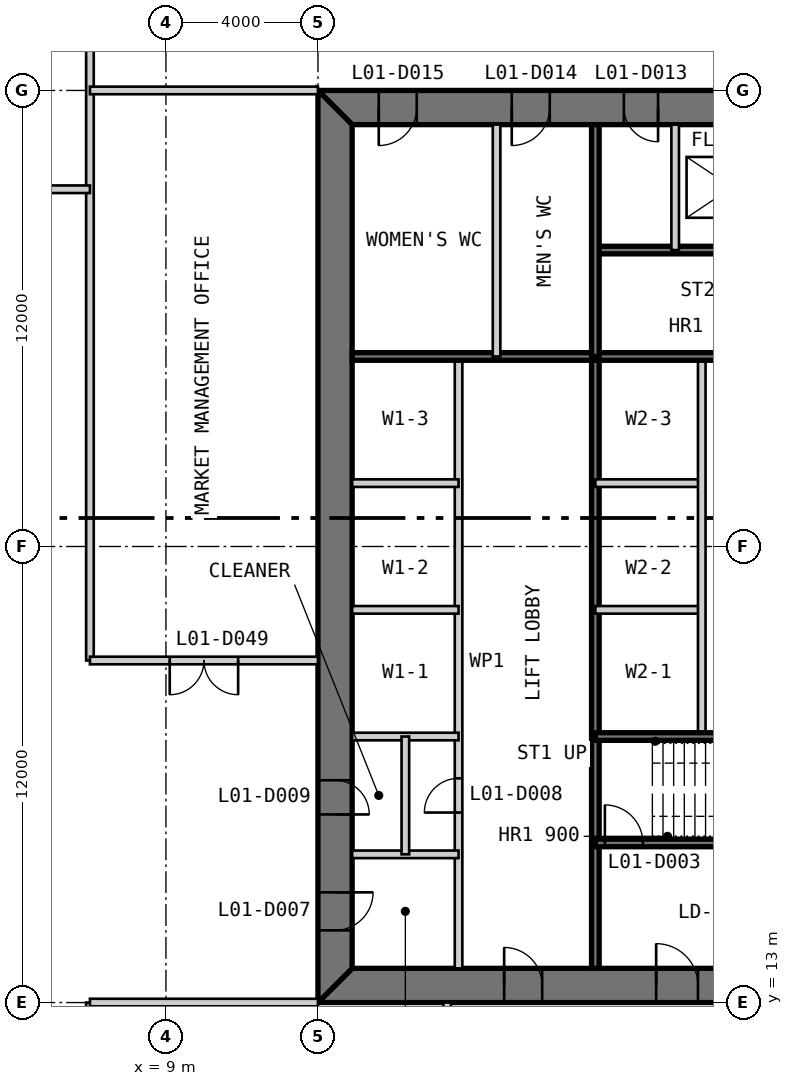
"""IFC4 building model, lengths in metres.
Left out: names, types, materials, properties, quantities, classifications, styles, units other than length and angle.
Written with IfcOpenShell. Run it as: python <this file> out.ifc"""

import sys

from ifc_helpers import new_model, si_unit, direction, frame, frame_2d, origin, place, context, subcontext, project, spatial, polyline, rectangle, outline, extrude, element, fill, save


model = new_model("IFC4")
c1 = context("Model", 3, precision=1e-05, world=origin(), true_north=direction((0.0, 1.0)))
c2 = subcontext(c1, "Body", "Model", "MODEL_VIEW")
j1 = project(units=[si_unit("LENGTHUNIT", "METRE"), si_unit("PLANEANGLEUNIT", "RADIAN")], contexts=[c1])
p1 = place(None, origin())
s1 = spatial("IfcSite", under=j1, at=p1, CompositionType="ELEMENT")
p2 = place(p1, origin())
s2 = spatial("IfcBuilding", under=s1, at=p2, CompositionType="ELEMENT")
p3 = place(p2, frame((0.0, 0.0, 7.0)))
s3 = spatial("IfcBuildingStorey", under=s2, at=p3, CompositionType="ELEMENT", Elevation=7.0)
p4 = place(p3, frame((13.0, 13.45, 0.0), z_axis=(0.0, 0.0, 1.0), x_axis=(1.0, 0.0, 0.0)))
e1 = element("IfcWall", 1, at=p4, inside=s3, PredefinedType="SHEAR", context=c2, shape_type="SweptSolid", body=[
    extrude(outline(polyline([(0.0, -0.45), (24.0, -0.45), (23.1, 0.45), (0.9, 0.45), (0.0, -0.45)])), origin(), (0.0, 0.0, 1.0), 4.8),
])
p5 = place(p4, frame((4.9, 0.0, 0.0)))
e2 = element("IfcOpeningElement", 2, at=p5, cuts=e1, PredefinedType="OPENING", context=c2, shape_type="SweptSolid", body=[
    extrude(rectangle(XDim=1.0, YDim=2.2, at=frame_2d((0.5, 1.1))), frame((0.0, 0.46, 0.0), z_axis=(0.0, -1.0, 0.0), x_axis=(1.0, 0.0, 0.0)), (0.0, 0.0, 1.0), 0.92),
])
p6 = place(p4, frame((8.9, 0.0, 0.0)))
e3 = element("IfcOpeningElement", 3, at=p6, cuts=e1, PredefinedType="OPENING", context=c2, shape_type="SweptSolid", body=[
    extrude(rectangle(XDim=1.1, YDim=2.2, at=frame_2d((0.55, 1.1))), frame((0.0, 0.46, 0.0), z_axis=(0.0, -1.0, 0.0), x_axis=(1.0, 0.0, 0.0)), (0.0, 0.0, 1.0), 0.92),
])
p7 = place(p4, frame((15.05, 0.0, 0.0)))
e4 = element("IfcOpeningElement", 4, at=p7, cuts=e1, PredefinedType="OPENING", context=c2, shape_type="SweptSolid", body=[
    extrude(rectangle(XDim=0.9, YDim=2.2, at=frame_2d((0.45, 1.1))), frame((0.0, 0.46, 0.0), z_axis=(0.0, -1.0, 0.0), x_axis=(1.0, 0.0, 0.0)), (0.0, 0.0, 1.0), 0.92),
])
p8 = place(p4, frame((17.9, 0.0, 0.0)))
e5 = element("IfcOpeningElement", 5, at=p8, cuts=e1, PredefinedType="OPENING", context=c2, shape_type="SweptSolid", body=[
    extrude(rectangle(XDim=1.0, YDim=2.2, at=frame_2d((0.5, 1.1))), frame((0.0, 0.46, 0.0), z_axis=(0.0, -1.0, 0.0), x_axis=(1.0, 0.0, 0.0)), (0.0, 0.0, 1.0), 0.92),
])
p9 = place(p4, frame((21.4, 0.0, 0.0)))
e6 = element("IfcOpeningElement", 6, at=p9, cuts=e1, PredefinedType="OPENING", context=c2, shape_type="SweptSolid", body=[
    extrude(rectangle(XDim=1.0, YDim=2.2, at=frame_2d((0.5, 1.1))), frame((0.0, 0.46, 0.0), z_axis=(0.0, -1.0, 0.0), x_axis=(1.0, 0.0, 0.0)), (0.0, 0.0, 1.0), 0.92),
])
p10 = place(p3, frame((37.0, 36.55, 0.0), z_axis=(0.0, 0.0, 1.0), x_axis=(-1.0, 0.0, 0.0)))
e7 = element("IfcWall", 7, at=p10, inside=s3, PredefinedType="SHEAR", context=c2, shape_type="SweptSolid", body=[
    extrude(outline(polyline([(0.0, -0.45), (24.0, -0.45), (23.1, 0.45), (0.9, 0.45), (0.0, -0.45)])), origin(), (0.0, 0.0, 1.0), 4.8),
])
p11 = place(p10, frame((4.9, 0.0, 0.0)))
e8 = element("IfcOpeningElement", 8, at=p11, cuts=e7, PredefinedType="OPENING", context=c2, shape_type="SweptSolid", body=[
    extrude(rectangle(XDim=1.0, YDim=2.2, at=frame_2d((0.5, 1.1))), frame((0.0, 0.46, 0.0), z_axis=(0.0, -1.0, 0.0), x_axis=(1.0, 0.0, 0.0)), (0.0, 0.0, 1.0), 0.92),
])
p12 = place(p10, frame((8.9, 0.0, 0.0)))
e9 = element("IfcOpeningElement", 9, at=p12, cuts=e7, PredefinedType="OPENING", context=c2, shape_type="SweptSolid", body=[
    extrude(rectangle(XDim=1.1, YDim=2.2, at=frame_2d((0.55, 1.1))), frame((0.0, 0.46, 0.0), z_axis=(0.0, -1.0, 0.0), x_axis=(1.0, 0.0, 0.0)), (0.0, 0.0, 1.0), 0.92),
])
p13 = place(p10, frame((15.05, 0.0, 0.0)))
e10 = element("IfcOpeningElement", 10, at=p13, cuts=e7, PredefinedType="OPENING", context=c2, shape_type="SweptSolid", body=[
    extrude(rectangle(XDim=0.9, YDim=2.2, at=frame_2d((0.45, 1.1))), frame((0.0, 0.46, 0.0), z_axis=(0.0, -1.0, 0.0), x_axis=(1.0, 0.0, 0.0)), (0.0, 0.0, 1.0), 0.92),
])
p14 = place(p10, frame((17.9, 0.0, 0.0)))
e11 = element("IfcOpeningElement", 11, at=p14, cuts=e7, PredefinedType="OPENING", context=c2, shape_type="SweptSolid", body=[
    extrude(rectangle(XDim=1.0, YDim=2.2, at=frame_2d((0.5, 1.1))), frame((0.0, 0.46, 0.0), z_axis=(0.0, -1.0, 0.0), x_axis=(1.0, 0.0, 0.0)), (0.0, 0.0, 1.0), 0.92),
])
p15 = place(p10, frame((21.4, 0.0, 0.0)))
e12 = element("IfcOpeningElement", 12, at=p15, cuts=e7, PredefinedType="OPENING", context=c2, shape_type="SweptSolid", body=[
    extrude(rectangle(XDim=1.0, YDim=2.2, at=frame_2d((0.5, 1.1))), frame((0.0, 0.46, 0.0), z_axis=(0.0, -1.0, 0.0), x_axis=(1.0, 0.0, 0.0)), (0.0, 0.0, 1.0), 0.92),
])
p16 = place(p3, frame((13.45, 36.1, 0.0), z_axis=(0.0, 0.0, 1.0), x_axis=(0.0, -1.0, 0.0)))
e13 = element("IfcWall", 13, at=p16, inside=s3, PredefinedType="SHEAR", context=c2, shape_type="SweptSolid", body=[
    extrude(outline(polyline([(-0.9, -0.45), (23.1, -0.45), (22.2, 0.45), (0.0, 0.45), (-0.9, -0.45)])), origin(), (0.0, 0.0, 1.0), 4.8),
])
p17 = place(p16, frame((20.2, 0.0, 0.0)))
e14 = element("IfcOpeningElement", 14, at=p17, cuts=e13, PredefinedType="OPENING", context=c2, shape_type="SweptSolid", body=[
    extrude(rectangle(XDim=1.0, YDim=2.2, at=frame_2d((0.5, 1.1))), frame((0.0, 0.46, 0.0), z_axis=(0.0, -1.0, 0.0), x_axis=(1.0, 0.0, 0.0)), (0.0, 0.0, 1.0), 0.92),
])
p18 = place(p16, frame((17.25, 0.0, 0.0)))
e15 = element("IfcOpeningElement", 15, at=p18, cuts=e13, PredefinedType="OPENING", context=c2, shape_type="SweptSolid", body=[
    extrude(rectangle(XDim=0.9, YDim=2.2, at=frame_2d((0.45, 1.1))), frame((0.0, 0.46, 0.0), z_axis=(0.0, -1.0, 0.0), x_axis=(1.0, 0.0, 0.0)), (0.0, 0.0, 1.0), 0.92),
])
p19 = place(p3, frame((16.7, 13.9, 0.0), z_axis=(0.0, 0.0, 1.0), x_axis=(0.0, 1.0, 0.0)))
e16 = element("IfcWall", 16, at=p19, inside=s3, PredefinedType="PARTITIONING", context=c2, shape_type="SweptSolid", body=[
    extrude(rectangle(XDim=16.1, YDim=0.2, at=frame_2d((8.05, 0.0))), origin(), (0.0, 0.0, 1.0), 4.6),
])
p20 = place(p19, frame((4.1, 0.0, 0.0)))
e17 = element("IfcOpeningElement", 17, at=p20, cuts=e16, PredefinedType="OPENING", context=c2, shape_type="SweptSolid", body=[
    extrude(rectangle(XDim=0.9, YDim=2.2, at=frame_2d((0.45, 1.1))), frame((0.0, 0.11, 0.0), z_axis=(0.0, -1.0, 0.0), x_axis=(1.0, 0.0, 0.0)), (0.0, 0.0, 1.0), 0.22),
])
p21 = place(p3, frame((20.3, 13.9, 0.0), z_axis=(0.0, 0.0, 1.0), x_axis=(0.0, 1.0, 0.0)))
e18 = element("IfcWall", 18, at=p21, inside=s3, PredefinedType="SOLIDWALL", context=c2, shape_type="SweptSolid", body=[
    extrude(rectangle(XDim=16.1, YDim=0.2, at=frame_2d((8.05, 0.0))), origin(), (0.0, 0.0, 1.0), 4.6),
])
for number, where, z_axis, x_axis in (
    (19, (13.9, 20.0, 0.0), (0.0, 0.0, 1.0), (1.0, 0.0, 0.0)),
    (20, (13.9, 23.333, 0.0), (0.0, 0.0, 1.0), (1.0, 0.0, 0.0)),
    (21, (13.9, 26.667, 0.0), (0.0, 0.0, 1.0), (1.0, 0.0, 0.0)),
    (22, (20.3, 23.333, 0.0), (0.0, 0.0, 1.0), (1.0, 0.0, 0.0)),
    (23, (20.3, 26.667, 0.0), (0.0, 0.0, 1.0), (1.0, 0.0, 0.0)),
):
    element("IfcWall", number, at=place(p3, frame(where, z_axis=z_axis, x_axis=x_axis)), inside=s3, PredefinedType="PARTITIONING", context=c2, shape_type="SweptSolid", body=[
        extrude(rectangle(XDim=2.8, YDim=0.2, at=frame_2d((1.4, 0.0))), origin(), (0.0, 0.0, 1.0), 4.6),
    ])
p22 = place(p3, frame((23.1, 20.0, 0.0), z_axis=(0.0, 0.0, 1.0), x_axis=(0.0, 1.0, 0.0)))
e24 = element("IfcWall", 24, at=p22, inside=s3, PredefinedType="PARTITIONING", context=c2, shape_type="SweptSolid", body=[
    extrude(rectangle(XDim=10.0, YDim=0.2, at=frame_2d((5.0, 0.0))), origin(), (0.0, 0.0, 1.0), 4.6),
])
p23 = place(p3, frame((20.3, 17.2, 0.0), z_axis=(0.0, 0.0, 1.0), x_axis=(1.0, 0.0, 0.0)))
e25 = element("IfcWall", 25, at=p23, inside=s3, PredefinedType="SOLIDWALL", context=c2, shape_type="SweptSolid", body=[
    extrude(rectangle(XDim=9.4, YDim=0.2, at=frame_2d((4.7, 0.0))), origin(), (0.0, 0.0, 1.0), 4.6),
])
p24 = place(p23, frame((0.25, 0.0, 0.0)))
e26 = element("IfcOpeningElement", 26, at=p24, cuts=e25, PredefinedType="OPENING", context=c2, shape_type="SweptSolid", body=[
    extrude(rectangle(XDim=1.0, YDim=2.2, at=frame_2d((0.5, 1.1))), frame((0.0, 0.11, 0.0), z_axis=(0.0, -1.0, 0.0), x_axis=(1.0, 0.0, 0.0)), (0.0, 0.0, 1.0), 0.22),
])
p25 = place(p3, frame((20.3, 20.0, 0.0), z_axis=(0.0, 0.0, 1.0), x_axis=(1.0, 0.0, 0.0)))
e27 = element("IfcWall", 27, at=p25, inside=s3, PredefinedType="SOLIDWALL", context=c2, shape_type="SweptSolid", body=[
    extrude(rectangle(XDim=15.8, YDim=0.2, at=frame_2d((7.9, 0.0))), origin(), (0.0, 0.0, 1.0), 4.6),
])
p26 = place(p3, frame((13.9, 16.9, 0.0), z_axis=(0.0, 0.0, 1.0), x_axis=(1.0, 0.0, 0.0)))
e28 = element("IfcWall", 28, at=p26, inside=s3, PredefinedType="PARTITIONING", context=c2, shape_type="SweptSolid", body=[
    extrude(rectangle(XDim=2.8, YDim=0.2, at=frame_2d((1.4, 0.0))), origin(), (0.0, 0.0, 1.0), 4.6),
])
p27 = place(p3, frame((15.3, 16.9, 0.0), z_axis=(0.0, 0.0, 1.0), x_axis=(0.0, 1.0, 0.0)))
e29 = element("IfcWall", 29, at=p27, inside=s3, PredefinedType="PARTITIONING", context=c2, shape_type="SweptSolid", body=[
    extrude(rectangle(XDim=3.1, YDim=0.2, at=frame_2d((1.55, 0.0))), origin(), (0.0, 0.0, 1.0), 4.6),
])
p28 = place(p3, frame((29.7, 32.8, 0.0), z_axis=(0.0, 0.0, 1.0), x_axis=(-1.0, 0.0, 0.0)))
e30 = element("IfcWall", 30, at=p28, inside=s3, PredefinedType="SOLIDWALL", context=c2, shape_type="SweptSolid", body=[
    extrude(rectangle(XDim=9.4, YDim=0.2, at=frame_2d((4.7, 0.0))), origin(), (0.0, 0.0, 1.0), 4.6),
])
p29 = place(p28, frame((0.25, 0.0, 0.0)))
e31 = element("IfcOpeningElement", 31, at=p29, cuts=e30, PredefinedType="OPENING", context=c2, shape_type="SweptSolid", body=[
    extrude(rectangle(XDim=1.0, YDim=2.2, at=frame_2d((0.5, 1.1))), frame((0.0, 0.11, 0.0), z_axis=(0.0, -1.0, 0.0), x_axis=(1.0, 0.0, 0.0)), (0.0, 0.0, 1.0), 0.22),
])
p30 = place(p3, frame((29.7, 30.0, 0.0), z_axis=(0.0, 0.0, 1.0), x_axis=(-1.0, 0.0, 0.0)))
e32 = element("IfcWall", 32, at=p30, inside=s3, PredefinedType="SOLIDWALL", context=c2, shape_type="SweptSolid", body=[
    extrude(rectangle(XDim=15.8, YDim=0.2, at=frame_2d((7.9, 0.0))), origin(), (0.0, 0.0, 1.0), 4.6),
])
p31 = place(p3, frame((22.4, 36.1, 0.0), z_axis=(0.0, 0.0, 1.0), x_axis=(0.0, -1.0, 0.0)))
e33 = element("IfcWall", 33, at=p31, inside=s3, PredefinedType="PARTITIONING", context=c2, shape_type="SweptSolid", body=[
    extrude(rectangle(XDim=3.3, YDim=0.2, at=frame_2d((1.65, 0.0))), origin(), (0.0, 0.0, 1.0), 4.6),
])
p32 = place(p3, frame((20.3, 36.1, 0.0), z_axis=(0.0, 0.0, 1.0), x_axis=(0.0, -1.0, 0.0)))
e34 = element("IfcWall", 34, at=p32, inside=s3, PredefinedType="SOLIDWALL", context=c2, shape_type="SweptSolid", body=[
    extrude(rectangle(XDim=6.1, YDim=0.2, at=frame_2d((3.05, 0.0))), origin(), (0.0, 0.0, 1.0), 4.6),
])
p33 = place(p3, frame((17.7, 36.1, 0.0), z_axis=(0.0, 0.0, 1.0), x_axis=(0.0, -1.0, 0.0)))
e35 = element("IfcWall", 35, at=p33, inside=s3, PredefinedType="PARTITIONING", context=c2, shape_type="SweptSolid", body=[
    extrude(rectangle(XDim=6.1, YDim=0.2, at=frame_2d((3.05, 0.0))), origin(), (0.0, 0.0, 1.0), 4.6),
])
p34 = place(p3, frame((7.0, 7.0, 0.0), z_axis=(0.0, 0.0, 1.0), x_axis=(0.0, 1.0, 0.0)))
e36 = element("IfcWall", 36, at=p34, inside=s3, PredefinedType="PARTITIONING", context=c2, shape_type="SweptSolid", body=[
    extrude(rectangle(XDim=6.0, YDim=0.2, at=frame_2d((3.0, 0.0))), origin(), (0.0, 0.0, 1.0), 4.5),
])
p35 = place(p3, frame((7.0, 22.0, 0.0), z_axis=(0.0, 0.0, 1.0), x_axis=(0.0, 1.0, 0.0)))
e37 = element("IfcWall", 37, at=p35, inside=s3, PredefinedType="PARTITIONING", context=c2, shape_type="SweptSolid", body=[
    extrude(rectangle(XDim=21.0, YDim=0.2, at=frame_2d((10.5, 0.0))), origin(), (0.0, 0.0, 1.0), 3.843),
])
p36 = place(p3, frame((16.4, 7.0, 0.0), z_axis=(0.0, 0.0, 1.0), x_axis=(0.0, 1.0, 0.0)))
e38 = element("IfcWall", 38, at=p36, inside=s3, PredefinedType="PARTITIONING", context=c2, shape_type="SweptSolid", body=[
    extrude(rectangle(XDim=6.0, YDim=0.2, at=frame_2d((3.0, 0.0))), origin(), (0.0, 0.0, 1.0), 4.5),
])
p37 = place(p3, frame((7.0, 13.0, 0.0), z_axis=(0.0, 0.0, 1.0), x_axis=(1.0, 0.0, 0.0)))
e39 = element("IfcWall", 39, at=p37, inside=s3, PredefinedType="PARTITIONING", context=c2, shape_type="SweptSolid", body=[
    extrude(rectangle(XDim=6.0, YDim=0.2, at=frame_2d((3.0, 0.0))), origin(), (0.0, 0.0, 1.0), 3.653),
])
p38 = place(p3, frame((7.0, 22.0, 0.0), z_axis=(0.0, 0.0, 1.0), x_axis=(1.0, 0.0, 0.0)))
e40 = element("IfcWall", 40, at=p38, inside=s3, PredefinedType="PARTITIONING", context=c2, shape_type="SweptSolid", body=[
    extrude(rectangle(XDim=6.0, YDim=0.2, at=frame_2d((3.0, 0.0))), origin(), (0.0, 0.0, 1.0), 4.5),
])
p39 = place(p38, frame((2.1, 0.0, 0.0)))
e41 = element("IfcOpeningElement", 41, at=p39, cuts=e40, PredefinedType="OPENING", context=c2, shape_type="SweptSolid", body=[
    extrude(rectangle(XDim=1.8, YDim=2.4, at=frame_2d((0.9, 1.2))), frame((0.0, 0.11, 0.0), z_axis=(0.0, -1.0, 0.0), x_axis=(1.0, 0.0, 0.0)), (0.0, 0.0, 1.0), 0.22),
])
p40 = place(p3, frame((-15.25, 34.4, 0.0), z_axis=(0.0, 0.0, 1.0), x_axis=(1.0, 0.0, 0.0)))
e42 = element("IfcWall", 42, at=p40, inside=s3, PredefinedType="PARTITIONING", context=c2, shape_type="SweptSolid", body=[
    extrude(rectangle(XDim=22.25, YDim=0.2, at=frame_2d((11.125, 0.0))), origin(), (0.0, 0.0, 1.0), 4.5),
])
p41 = place(p40, frame((17.525, 0.0, 0.0)))
e43 = element("IfcOpeningElement", 43, at=p41, cuts=e42, PredefinedType="OPENING", context=c2, shape_type="SweptSolid", body=[
    extrude(rectangle(XDim=1.8, YDim=2.4, at=frame_2d((0.9, 1.2))), frame((0.0, 0.11, 0.0), z_axis=(0.0, -1.0, 0.0), x_axis=(1.0, 0.0, 0.0)), (0.0, 0.0, 1.0), 0.22),
])
p42 = place(p40, frame((10.325, 0.0, 0.0)))
e44 = element("IfcOpeningElement", 44, at=p42, cuts=e42, PredefinedType="OPENING", context=c2, shape_type="SweptSolid", body=[
    extrude(rectangle(XDim=1.8, YDim=2.4, at=frame_2d((0.9, 1.2))), frame((0.0, 0.11, 0.0), z_axis=(0.0, -1.0, 0.0), x_axis=(1.0, 0.0, 0.0)), (0.0, 0.0, 1.0), 0.22),
])
p43 = place(p40, frame((3.025, 0.0, 0.0)))
e45 = element("IfcOpeningElement", 45, at=p43, cuts=e42, PredefinedType="OPENING", context=c2, shape_type="SweptSolid", body=[
    extrude(rectangle(XDim=1.8, YDim=2.4, at=frame_2d((0.9, 1.2))), frame((0.0, 0.11, 0.0), z_axis=(0.0, -1.0, 0.0), x_axis=(1.0, 0.0, 0.0)), (0.0, 0.0, 1.0), 0.22),
])
p44 = place(p3, frame((7.0, 37.0, 0.0), z_axis=(0.0, 0.0, 1.0), x_axis=(1.0, 0.0, 0.0)))
e46 = element("IfcWall", 46, at=p44, inside=s3, PredefinedType="PARTITIONING", context=c2, shape_type="SweptSolid", body=[
    extrude(rectangle(XDim=6.0, YDim=0.2, at=frame_2d((3.0, 0.0))), origin(), (0.0, 0.0, 1.0), 3.653),
])
p45 = place(p5, origin())
e47 = element("IfcDoor", 47, at=p45, inside=s3, OperationType="SINGLE_SWING_LEFT", PredefinedType="DOOR", context=c2, shape_type="SweptSolid", body=[
    extrude(rectangle(XDim=1.0, YDim=2.2, at=frame_2d((0.5, 1.1))), frame((0.0, 0.025, 0.0), z_axis=(0.0, -1.0, 0.0), x_axis=(1.0, 0.0, 0.0)), (0.0, 0.0, 1.0), 0.05),
    extrude(outline(polyline([(0.0, 0.0), (0.04, 0.0), (0.04, 2.16), (0.96, 2.16), (0.96, 0.0), (1.0, 0.0), (1.0, 2.2), (0.0, 2.2), (0.0, 0.0)])), frame((0.0, 0.3, 0.0), z_axis=(0.0, -1.0, 0.0), x_axis=(1.0, 0.0, 0.0)), (0.0, 0.0, 1.0), 0.6),
])
fill(e2, e47)
p46 = place(p6, origin())
e48 = element("IfcDoor", 48, at=p46, inside=s3, OperationType="SINGLE_SWING_LEFT", PredefinedType="DOOR", context=c2, shape_type="SweptSolid", body=[
    extrude(rectangle(XDim=1.1, YDim=2.2, at=frame_2d((0.55, 1.1))), frame((0.0, 0.025, 0.0), z_axis=(0.0, -1.0, 0.0), x_axis=(1.0, 0.0, 0.0)), (0.0, 0.0, 1.0), 0.05),
    extrude(outline(polyline([(0.0, 0.0), (0.04, 0.0), (0.04, 2.16), (1.06, 2.16), (1.06, 0.0), (1.1, 0.0), (1.1, 2.2), (0.0, 2.2), (0.0, 0.0)])), frame((0.0, 0.3, 0.0), z_axis=(0.0, -1.0, 0.0), x_axis=(1.0, 0.0, 0.0)), (0.0, 0.0, 1.0), 0.6),
])
fill(e3, e48)
p47 = place(p24, origin())
e49 = element("IfcDoor", 49, at=p47, inside=s3, OperationType="SINGLE_SWING_LEFT", PredefinedType="DOOR", context=c2, shape_type="SweptSolid", body=[
    extrude(rectangle(XDim=1.0, YDim=2.2, at=frame_2d((0.5, 1.1))), frame((0.0, 0.025, 0.0), z_axis=(0.0, -1.0, 0.0), x_axis=(1.0, 0.0, 0.0)), (0.0, 0.0, 1.0), 0.05),
])
fill(e26, e49)
p48 = place(p17, origin())
e50 = element("IfcDoor", 50, at=p48, inside=s3, OperationType="SINGLE_SWING_LEFT", PredefinedType="DOOR", context=c2, shape_type="SweptSolid", body=[
    extrude(rectangle(XDim=1.0, YDim=2.2, at=frame_2d((0.5, 1.1))), frame((0.0, 0.025, 0.0), z_axis=(0.0, -1.0, 0.0), x_axis=(1.0, 0.0, 0.0)), (0.0, 0.0, 1.0), 0.05),
    extrude(outline(polyline([(0.0, 0.0), (0.04, 0.0), (0.04, 2.16), (0.96, 2.16), (0.96, 0.0), (1.0, 0.0), (1.0, 2.2), (0.0, 2.2), (0.0, 0.0)])), frame((0.0, 0.3, 0.0), z_axis=(0.0, -1.0, 0.0), x_axis=(1.0, 0.0, 0.0)), (0.0, 0.0, 1.0), 0.6),
])
fill(e14, e50)
p49 = place(p20, origin())
e51 = element("IfcDoor", 51, at=p49, inside=s3, OperationType="SINGLE_SWING_LEFT", PredefinedType="DOOR", context=c2, shape_type="SweptSolid", body=[
    extrude(rectangle(XDim=0.9, YDim=2.2, at=frame_2d((0.45, 1.1))), frame((0.0, 0.025, 0.0), z_axis=(0.0, -1.0, 0.0), x_axis=(1.0, 0.0, 0.0)), (0.0, 0.0, 1.0), 0.05),
])
fill(e17, e51)
p50 = place(p18, origin())
e52 = element("IfcDoor", 52, at=p50, inside=s3, OperationType="SINGLE_SWING_RIGHT", PredefinedType="DOOR", context=c2, shape_type="SweptSolid", body=[
    extrude(rectangle(XDim=0.9, YDim=2.2, at=frame_2d((0.45, 1.1))), frame((0.0, 0.025, 0.0), z_axis=(0.0, -1.0, 0.0), x_axis=(1.0, 0.0, 0.0)), (0.0, 0.0, 1.0), 0.05),
    extrude(outline(polyline([(0.0, 0.0), (0.04, 0.0), (0.04, 2.16), (0.86, 2.16), (0.86, 0.0), (0.9, 0.0), (0.9, 2.2), (0.0, 2.2), (0.0, 0.0)])), frame((0.0, 0.3, 0.0), z_axis=(0.0, -1.0, 0.0), x_axis=(1.0, 0.0, 0.0)), (0.0, 0.0, 1.0), 0.6),
])
fill(e15, e52)
p51 = place(p13, origin())
e53 = element("IfcDoor", 53, at=p51, inside=s3, OperationType="SINGLE_SWING_LEFT", PredefinedType="DOOR", context=c2, shape_type="SweptSolid", body=[
    extrude(rectangle(XDim=0.9, YDim=2.2, at=frame_2d((0.45, 1.1))), frame((0.0, 0.025, 0.0), z_axis=(0.0, -1.0, 0.0), x_axis=(1.0, 0.0, 0.0)), (0.0, 0.0, 1.0), 0.05),
    extrude(outline(polyline([(0.0, 0.0), (0.04, 0.0), (0.04, 2.16), (0.86, 2.16), (0.86, 0.0), (0.9, 0.0), (0.9, 2.2), (0.0, 2.2), (0.0, 0.0)])), frame((0.0, 0.3, 0.0), z_axis=(0.0, -1.0, 0.0), x_axis=(1.0, 0.0, 0.0)), (0.0, 0.0, 1.0), 0.6),
])
fill(e10, e53)
p52 = place(p14, origin())
e54 = element("IfcDoor", 54, at=p52, inside=s3, OperationType="SINGLE_SWING_RIGHT", PredefinedType="DOOR", context=c2, shape_type="SweptSolid", body=[
    extrude(rectangle(XDim=1.0, YDim=2.2, at=frame_2d((0.5, 1.1))), frame((0.0, 0.025, 0.0), z_axis=(0.0, -1.0, 0.0), x_axis=(1.0, 0.0, 0.0)), (0.0, 0.0, 1.0), 0.05),
    extrude(outline(polyline([(0.0, 0.0), (0.04, 0.0), (0.04, 2.16), (0.96, 2.16), (0.96, 0.0), (1.0, 0.0), (1.0, 2.2), (0.0, 2.2), (0.0, 0.0)])), frame((0.0, 0.3, 0.0), z_axis=(0.0, -1.0, 0.0), x_axis=(1.0, 0.0, 0.0)), (0.0, 0.0, 1.0), 0.6),
])
fill(e11, e54)
p53 = place(p15, origin())
e55 = element("IfcDoor", 55, at=p53, inside=s3, OperationType="SINGLE_SWING_RIGHT", PredefinedType="DOOR", context=c2, shape_type="SweptSolid", body=[
    extrude(rectangle(XDim=1.0, YDim=2.2, at=frame_2d((0.5, 1.1))), frame((0.0, 0.025, 0.0), z_axis=(0.0, -1.0, 0.0), x_axis=(1.0, 0.0, 0.0)), (0.0, 0.0, 1.0), 0.05),
    extrude(outline(polyline([(0.0, 0.0), (0.04, 0.0), (0.04, 2.16), (0.96, 2.16), (0.96, 0.0), (1.0, 0.0), (1.0, 2.2), (0.0, 2.2), (0.0, 0.0)])), frame((0.0, 0.3, 0.0), z_axis=(0.0, -1.0, 0.0), x_axis=(1.0, 0.0, 0.0)), (0.0, 0.0, 1.0), 0.6),
])
fill(e12, e55)
p54 = place(p39, frame((1.8, 0.0, 0.0), z_axis=(0.0, 0.0, 1.0), x_axis=(-1.0, 0.0, 0.0)))
e56 = element("IfcDoor", 56, at=p54, inside=s3, OperationType="DOUBLE_DOOR_SINGLE_SWING", PredefinedType="DOOR", context=c2, shape_type="SweptSolid", body=[
    extrude(rectangle(XDim=1.8, YDim=2.4, at=frame_2d((0.9, 1.2))), frame((0.0, 0.025, 0.0), z_axis=(0.0, -1.0, 0.0), x_axis=(1.0, 0.0, 0.0)), (0.0, 0.0, 1.0), 0.05),
])
fill(e41, e56)
save(model, sys.argv[1])
